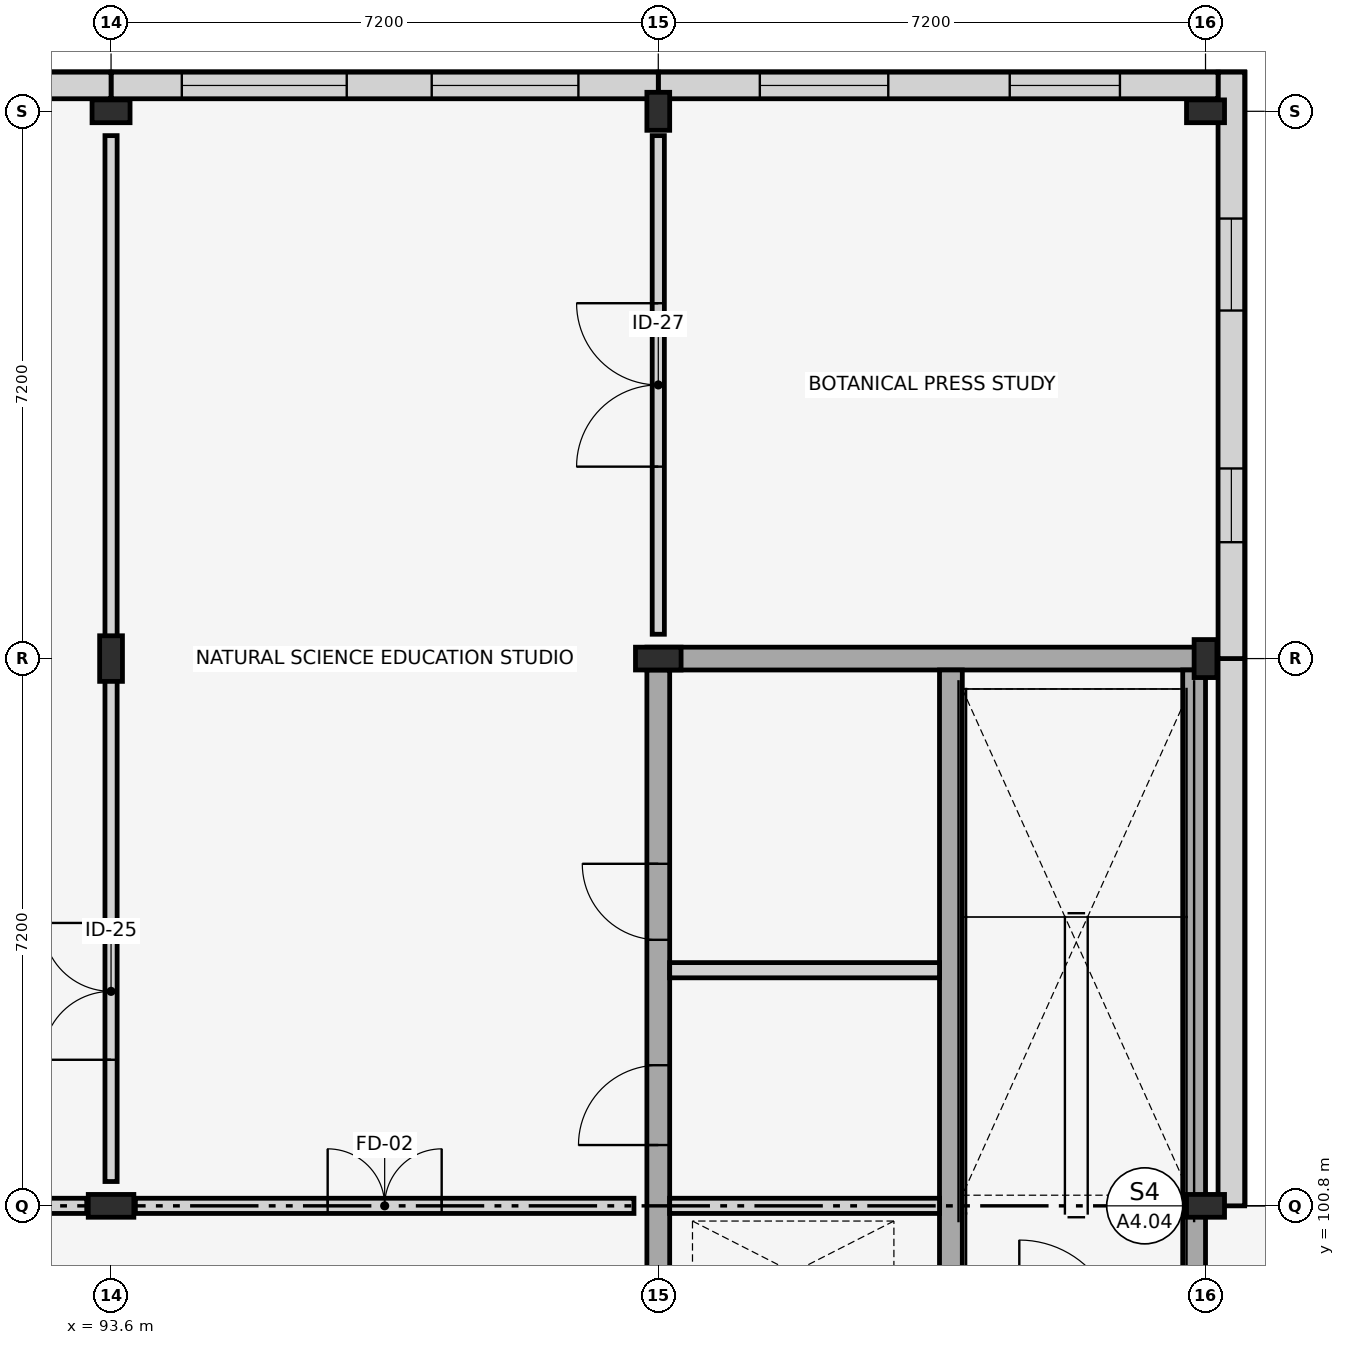
"""IFC4 building model, lengths in metres.
Left out: names, types, materials, properties, quantities, classifications, styles, units other than length and angle.
Written with IfcOpenShell. Run it as: python <this file> out.ifc"""

import sys

from ifc_helpers import new_model, si_unit, direction, frame, frame_2d, origin, origin_2d, place, context, subcontext, project, spatial, rectangle, i_section, extrude, element, fill, save


model = new_model("IFC4")
c1 = context("Model", 3, precision=1e-05, world=origin(), true_north=direction((0.0, 1.0)))
c2 = subcontext(c1, "Body", "Model", "MODEL_VIEW")
j1 = project(units=[si_unit("LENGTHUNIT", "METRE"), si_unit("PLANEANGLEUNIT", "RADIAN")], contexts=[c1])
p1 = place(None, origin())
s1 = spatial("IfcSite", under=j1, at=p1, CompositionType="ELEMENT")
p2 = place(p1, origin())
s2 = spatial("IfcBuilding", under=s1, at=p2, CompositionType="ELEMENT")
p3 = place(p2, origin())
s3 = spatial("IfcBuildingStorey", under=s2, at=p3, CompositionType="ELEMENT", Elevation=0.0)
for number, where, z_axis, x_axis in (
    (1, (93.6, 100.8, 0.0), (0.0, 0.0, 1.0), (0.0, 1.0, 0.0)),
    (2, (93.6, 108.0, 0.0), (0.0, 0.0, 1.0), (1.0, 0.0, 0.0)),
):
    element("IfcColumn", number, at=place(p3, frame(where, z_axis=z_axis, x_axis=x_axis)), inside=s3, PredefinedType="COLUMN", context=c2, shape_type="SweptSolid", body=[
        extrude(i_section(OverallWidth=0.3, OverallDepth=0.6, WebThickness=0.015, FlangeThickness=0.03, FilletRadius=0.027, at=origin_2d()), origin(), (0.0, 0.0, 1.0), 4.5),
    ])
p4 = place(p3, frame((93.6, 115.2, 0.0), z_axis=(0.0, 0.0, 1.0), x_axis=(0.0, 1.0, 0.0)))
e3 = element("IfcColumn", 3, at=p4, inside=s3, PredefinedType="COLUMN", context=c2, shape_type="SweptSolid", body=[
    extrude(i_section(OverallWidth=0.3, OverallDepth=0.5, WebThickness=0.014, FlangeThickness=0.028, FilletRadius=0.027, at=origin_2d()), origin(), (0.0, 0.0, 1.0), 4.5),
])
p5 = place(p3, frame((100.8, 108.0, 0.0), z_axis=(0.0, 0.0, 1.0), x_axis=(0.0, 1.0, 0.0)))
e4 = element("IfcColumn", 4, at=p5, inside=s3, PredefinedType="COLUMN", context=c2, shape_type="SweptSolid", body=[
    extrude(i_section(OverallWidth=0.3, OverallDepth=0.6, WebThickness=0.015, FlangeThickness=0.03, FilletRadius=0.027, at=origin_2d()), origin(), (0.0, 0.0, 1.0), 4.5),
])
for number, where, z_axis, x_axis in (
    (5, (100.8, 115.2, 0.0), (0.0, 0.0, 1.0), (1.0, 0.0, 0.0)),
    (6, (108.0, 100.8, 0.0), (0.0, 0.0, 1.0), (0.0, 1.0, 0.0)),
    (7, (108.0, 108.0, 0.0), (0.0, 0.0, 1.0), (1.0, 0.0, 0.0)),
    (8, (108.0, 115.2, 0.0), (0.0, 0.0, 1.0), (0.0, 1.0, 0.0)),
):
    element("IfcColumn", number, at=place(p3, frame(where, z_axis=z_axis, x_axis=x_axis)), inside=s3, PredefinedType="COLUMN", context=c2, shape_type="SweptSolid", body=[
        extrude(i_section(OverallWidth=0.3, OverallDepth=0.5, WebThickness=0.014, FlangeThickness=0.028, FilletRadius=0.027, at=origin_2d()), origin(), (0.0, 0.0, 1.0), 4.5),
    ])
p6 = place(p3, frame((108.34, 100.8, 0.0), z_axis=(0.0, 0.0, 1.0), x_axis=(0.0, 1.0, 0.0)))
e9 = element("IfcWall", 9, at=p6, inside=s3, PredefinedType="STANDARD", context=c2, shape_type="SweptSolid", body=[
    extrude(rectangle(XDim=7.2, YDim=0.35, at=frame_2d((3.6, 0.0))), origin(), (0.0, 0.0, 1.0), 4.5),
])
p7 = place(p3, frame((108.34, 108.0, 0.0), z_axis=(0.0, 0.0, 1.0), x_axis=(0.0, 1.0, 0.0)))
e10 = element("IfcWall", 10, at=p7, inside=s3, PredefinedType="STANDARD", context=c2, shape_type="SweptSolid", body=[
    extrude(rectangle(XDim=7.715, YDim=0.35, at=frame_2d((3.857, 0.0))), origin(), (0.0, 0.0, 1.0), 4.5),
])
p8 = place(p7, frame((1.531, 0.0, 0.9)))
e11 = element("IfcOpeningElement", 11, at=p8, cuts=e10, PredefinedType="OPENING", context=c2, shape_type="SweptSolid", body=[
    extrude(rectangle(XDim=0.97, YDim=1.96, at=frame_2d((0.485, 0.98))), frame((0.0, 0.185, 0.0), z_axis=(0.0, -1.0, 0.0), x_axis=(1.0, 0.0, 0.0)), (0.0, 0.0, 1.0), 0.37),
])
p9 = place(p7, frame((4.579, 0.0, 0.9)))
e12 = element("IfcOpeningElement", 12, at=p9, cuts=e10, PredefinedType="OPENING", context=c2, shape_type="SweptSolid", body=[
    extrude(rectangle(XDim=1.21, YDim=1.96, at=frame_2d((0.605, 0.98))), frame((0.0, 0.185, 0.0), z_axis=(0.0, -1.0, 0.0), x_axis=(1.0, 0.0, 0.0)), (0.0, 0.0, 1.0), 0.37),
])
p10 = place(p3, frame((108.165, 115.54, 0.0), z_axis=(0.0, 0.0, 1.0), x_axis=(-1.0, 0.0, 0.0)))
e13 = element("IfcWall", 13, at=p10, inside=s3, PredefinedType="STANDARD", context=c2, shape_type="SweptSolid", body=[
    extrude(rectangle(XDim=7.365, YDim=0.35, at=frame_2d((3.683, 0.0))), origin(), (0.0, 0.0, 1.0), 4.5),
])
p11 = place(p10, frame((1.291, 0.0, 0.9)))
e14 = element("IfcOpeningElement", 14, at=p11, cuts=e13, PredefinedType="OPENING", context=c2, shape_type="SweptSolid", body=[
    extrude(rectangle(XDim=1.45, YDim=1.96, at=frame_2d((0.725, 0.98))), frame((0.0, 0.185, 0.0), z_axis=(0.0, -1.0, 0.0), x_axis=(1.0, 0.0, 0.0)), (0.0, 0.0, 1.0), 0.37),
])
p12 = place(p10, frame((4.339, 0.0, 0.9)))
e15 = element("IfcOpeningElement", 15, at=p12, cuts=e13, PredefinedType="OPENING", context=c2, shape_type="SweptSolid", body=[
    extrude(rectangle(XDim=1.69, YDim=1.96, at=frame_2d((0.845, 0.98))), frame((0.0, 0.185, 0.0), z_axis=(0.0, -1.0, 0.0), x_axis=(1.0, 0.0, 0.0)), (0.0, 0.0, 1.0), 0.37),
])
p13 = place(p3, frame((100.8, 115.54, 0.0), z_axis=(0.0, 0.0, 1.0), x_axis=(-1.0, 0.0, 0.0)))
e16 = element("IfcWall", 16, at=p13, inside=s3, PredefinedType="STANDARD", context=c2, shape_type="SweptSolid", body=[
    extrude(rectangle(XDim=7.2, YDim=0.35, at=frame_2d((3.6, 0.0))), origin(), (0.0, 0.0, 1.0), 4.5),
])
p14 = place(p13, frame((1.051, 0.0, 0.9)))
e17 = element("IfcOpeningElement", 17, at=p14, cuts=e16, PredefinedType="OPENING", context=c2, shape_type="SweptSolid", body=[
    extrude(rectangle(XDim=1.93, YDim=1.96, at=frame_2d((0.965, 0.98))), frame((0.0, 0.185, 0.0), z_axis=(0.0, -1.0, 0.0), x_axis=(1.0, 0.0, 0.0)), (0.0, 0.0, 1.0), 0.37),
])
p15 = place(p13, frame((4.099, 0.0, 0.9)))
e18 = element("IfcOpeningElement", 18, at=p15, cuts=e16, PredefinedType="OPENING", context=c2, shape_type="SweptSolid", body=[
    extrude(rectangle(XDim=2.17, YDim=1.96, at=frame_2d((1.085, 0.98))), frame((0.0, 0.185, 0.0), z_axis=(0.0, -1.0, 0.0), x_axis=(1.0, 0.0, 0.0)), (0.0, 0.0, 1.0), 0.37),
])
p16 = place(p3, frame((93.6, 115.54, 0.0), z_axis=(0.0, 0.0, 1.0), x_axis=(-1.0, 0.0, 0.0)))
e19 = element("IfcWall", 19, at=p16, inside=s3, PredefinedType="STANDARD", context=c2, shape_type="SweptSolid", body=[
    extrude(rectangle(XDim=7.2, YDim=0.35, at=frame_2d((3.6, 0.0))), origin(), (0.0, 0.0, 1.0), 4.5),
])
p17 = place(p16, frame((1.516, 0.0, 0.9)))
e20 = element("IfcOpeningElement", 20, at=p17, cuts=e19, PredefinedType="OPENING", context=c2, shape_type="SweptSolid", body=[
    extrude(rectangle(XDim=1.0, YDim=2.1, at=frame_2d((0.5, 1.05))), frame((0.0, 0.185, 0.0), z_axis=(0.0, -1.0, 0.0), x_axis=(1.0, 0.0, 0.0)), (0.0, 0.0, 1.0), 0.37),
])
p18 = place(p16, frame((4.564, 0.0, 0.9)))
e21 = element("IfcOpeningElement", 21, at=p18, cuts=e19, PredefinedType="OPENING", context=c2, shape_type="SweptSolid", body=[
    extrude(rectangle(XDim=1.24, YDim=2.1, at=frame_2d((0.62, 1.05))), frame((0.0, 0.185, 0.0), z_axis=(0.0, -1.0, 0.0), x_axis=(1.0, 0.0, 0.0)), (0.0, 0.0, 1.0), 0.37),
])
p19 = place(p3, frame((100.65, 108.0, 0.0), z_axis=(0.0, 0.0, 1.0), x_axis=(1.0, 0.0, 0.0)))
e22 = element("IfcWall", 22, at=p19, inside=s3, PredefinedType="SHEAR", context=c2, shape_type="SweptSolid", body=[
    extrude(rectangle(XDim=7.35, YDim=0.3, at=frame_2d((3.675, 0.0))), origin(), (0.0, 0.0, 1.0), 4.28),
])
p20 = place(p3, frame((107.85, 93.75, 0.0), z_axis=(0.0, 0.0, 1.0), x_axis=(0.0, 1.0, 0.0)))
e23 = element("IfcWall", 23, at=p20, inside=s3, PredefinedType="SHEAR", context=c2, shape_type="SweptSolid", body=[
    extrude(rectangle(XDim=7.05, YDim=0.3, at=frame_2d((3.525, 0.0))), origin(), (0.0, 0.0, 1.0), 4.28),
])
p21 = place(p20, frame((3.65, 0.0, 0.0)))
e24 = element("IfcOpeningElement", 24, at=p21, cuts=e23, PredefinedType="OPENING", context=c2, shape_type="SweptSolid", body=[
    extrude(rectangle(XDim=1.1, YDim=2.2, at=frame_2d((0.55, 1.1))), frame((0.0, 0.16, 0.0), z_axis=(0.0, -1.0, 0.0), x_axis=(1.0, 0.0, 0.0)), (0.0, 0.0, 1.0), 0.32),
])
p22 = place(p3, frame((107.85, 100.8, 0.0), z_axis=(0.0, 0.0, 1.0), x_axis=(0.0, 1.0, 0.0)))
e25 = element("IfcWall", 25, at=p22, inside=s3, PredefinedType="SHEAR", context=c2, shape_type="SweptSolid", body=[
    extrude(rectangle(XDim=7.05, YDim=0.3, at=frame_2d((3.525, 0.0))), origin(), (0.0, 0.0, 1.0), 4.28),
])
p23 = place(p3, frame((100.8, 93.75, 0.0), z_axis=(0.0, 0.0, 1.0), x_axis=(0.0, 1.0, 0.0)))
e26 = element("IfcWall", 26, at=p23, inside=s3, PredefinedType="SHEAR", context=c2, shape_type="SweptSolid", body=[
    extrude(rectangle(XDim=14.1, YDim=0.3, at=frame_2d((7.05, 0.0))), origin(), (0.0, 0.0, 1.0), 4.28),
])
p24 = place(p23, frame((3.55, 0.0, 0.0)))
e27 = element("IfcOpeningElement", 27, at=p24, cuts=e26, PredefinedType="OPENING", context=c2, shape_type="SweptSolid", body=[
    extrude(rectangle(XDim=1.3, YDim=2.2, at=frame_2d((0.65, 1.1))), frame((0.0, 0.16, 0.0), z_axis=(0.0, -1.0, 0.0), x_axis=(1.0, 0.0, 0.0)), (0.0, 0.0, 1.0), 0.32),
])
p25 = place(p23, frame((7.85, 0.0, 0.0)))
e28 = element("IfcOpeningElement", 28, at=p25, cuts=e26, PredefinedType="OPENING", context=c2, shape_type="SweptSolid", body=[
    extrude(rectangle(XDim=1.05, YDim=2.15, at=frame_2d((0.525, 1.075))), frame((0.0, 0.16, 0.0), z_axis=(0.0, -1.0, 0.0), x_axis=(1.0, 0.0, 0.0)), (0.0, 0.0, 1.0), 0.32),
])
p26 = place(p23, frame((10.55, 0.0, 0.0)))
e29 = element("IfcOpeningElement", 29, at=p26, cuts=e26, PredefinedType="OPENING", context=c2, shape_type="SweptSolid", body=[
    extrude(rectangle(XDim=1.0, YDim=2.15, at=frame_2d((0.5, 1.075))), frame((0.0, 0.16, 0.0), z_axis=(0.0, -1.0, 0.0), x_axis=(1.0, 0.0, 0.0)), (0.0, 0.0, 1.0), 0.32),
])
p27 = place(p3, frame((104.65, 98.94, 0.0), z_axis=(0.0, 0.0, 1.0), x_axis=(0.0, 1.0, 0.0)))
e30 = element("IfcWall", 30, at=p27, inside=s3, PredefinedType="SHEAR", context=c2, shape_type="SweptSolid", body=[
    extrude(rectangle(XDim=8.91, YDim=0.3, at=frame_2d((4.455, 0.0))), origin(), (0.0, 0.0, 1.0), 4.28),
])
for number, where, z_axis, x_axis in (
    (31, (100.95, 100.8, 0.0), (0.0, 0.0, 1.0), (1.0, 0.0, 0.0)),
    (32, (100.95, 103.9, 0.0), (0.0, 0.0, 1.0), (1.0, 0.0, 0.0)),
):
    element("IfcWall", number, at=place(p3, frame(where, z_axis=z_axis, x_axis=x_axis)), inside=s3, PredefinedType="PLUMBINGWALL", context=c2, shape_type="SweptSolid", body=[
        extrude(rectangle(XDim=3.55, YDim=0.2, at=frame_2d((1.775, 0.0))), origin(), (0.0, 0.0, 1.0), 3.7),
    ])
p28 = place(p3, frame((65.12, 100.8, 0.0), z_axis=(0.0, 0.0, 1.0), x_axis=(1.0, 0.0, 0.0)))
e33 = element("IfcWall", 33, at=p28, inside=s3, PredefinedType="PARTITIONING", context=c2, shape_type="SweptSolid", body=[
    extrude(rectangle(XDim=28.16, YDim=0.2, at=frame_2d((14.08, 0.0))), origin(), (0.0, 0.0, 1.0), 3.45),
])
p29 = place(p28, frame((1.649, 0.0, 0.0)))
e34 = element("IfcOpeningElement", 34, at=p29, cuts=e33, PredefinedType="OPENING", context=c2, shape_type="SweptSolid", body=[
    extrude(rectangle(XDim=1.6, YDim=2.35, at=frame_2d((0.8, 1.175))), frame((0.0, 0.11, 0.0), z_axis=(0.0, -1.0, 0.0), x_axis=(1.0, 0.0, 0.0)), (0.0, 0.0, 1.0), 0.22),
])
p30 = place(p3, frame((93.92, 100.8, 0.0), z_axis=(0.0, 0.0, 1.0), x_axis=(1.0, 0.0, 0.0)))
e35 = element("IfcWall", 35, at=p30, inside=s3, PredefinedType="PARTITIONING", context=c2, shape_type="SweptSolid", body=[
    extrude(rectangle(XDim=6.56, YDim=0.2, at=frame_2d((3.28, 0.0))), origin(), (0.0, 0.0, 1.0), 3.45),
])
p31 = place(p30, frame((2.53, 0.0, 0.0)))
e36 = element("IfcOpeningElement", 36, at=p31, cuts=e35, PredefinedType="OPENING", context=c2, shape_type="SweptSolid", body=[
    extrude(rectangle(XDim=1.5, YDim=2.25, at=frame_2d((0.75, 1.125))), frame((0.0, 0.11, 0.0), z_axis=(0.0, -1.0, 0.0), x_axis=(1.0, 0.0, 0.0)), (0.0, 0.0, 1.0), 0.22),
])
p32 = place(p3, frame((93.6, 101.12, 0.0), z_axis=(0.0, 0.0, 1.0), x_axis=(0.0, 1.0, 0.0)))
e37 = element("IfcWall", 37, at=p32, inside=s3, PredefinedType="PARTITIONING", context=c2, shape_type="SweptSolid", body=[
    extrude(rectangle(XDim=13.76, YDim=0.16, at=frame_2d((6.88, 0.0))), origin(), (0.0, 0.0, 1.0), 3.45),
])
p33 = place(p32, frame((1.602, 0.0, 0.0)))
e38 = element("IfcOpeningElement", 38, at=p33, cuts=e37, PredefinedType="OPENING", context=c2, shape_type="SweptSolid", body=[
    extrude(rectangle(XDim=1.8, YDim=2.55, at=frame_2d((0.9, 1.275))), frame((0.0, 0.09, 0.0), z_axis=(0.0, -1.0, 0.0), x_axis=(1.0, 0.0, 0.0)), (0.0, 0.0, 1.0), 0.18),
])
p34 = place(p3, frame((100.8, 108.32, 0.0), z_axis=(0.0, 0.0, 1.0), x_axis=(0.0, 1.0, 0.0)))
e39 = element("IfcWall", 39, at=p34, inside=s3, PredefinedType="PARTITIONING", context=c2, shape_type="SweptSolid", body=[
    extrude(rectangle(XDim=6.56, YDim=0.16, at=frame_2d((3.28, 0.0))), origin(), (0.0, 0.0, 1.0), 3.45),
])
p35 = place(p34, frame((2.205, 0.0, 0.0)))
e40 = element("IfcOpeningElement", 40, at=p35, cuts=e39, PredefinedType="OPENING", context=c2, shape_type="SweptSolid", body=[
    extrude(rectangle(XDim=2.15, YDim=2.65, at=frame_2d((1.075, 1.325))), frame((0.0, 0.09, 0.0), z_axis=(0.0, -1.0, 0.0), x_axis=(1.0, 0.0, 0.0)), (0.0, 0.0, 1.0), 0.18),
])
p36 = place(p8, origin())
e41 = element("IfcWindow", 41, at=p36, inside=s3, PartitioningType="SINGLE_PANEL", PredefinedType="WINDOW", context=c2, shape_type="SweptSolid", body=[
    extrude(rectangle(XDim=0.97, YDim=1.96, at=frame_2d((0.485, 0.98))), frame((0.0, 0.03, 0.0), z_axis=(0.0, -1.0, 0.0), x_axis=(1.0, 0.0, 0.0)), (0.0, 0.0, 1.0), 0.06),
])
fill(e11, e41)
p37 = place(p9, origin())
e42 = element("IfcWindow", 42, at=p37, inside=s3, PartitioningType="SINGLE_PANEL", PredefinedType="WINDOW", context=c2, shape_type="SweptSolid", body=[
    extrude(rectangle(XDim=1.21, YDim=1.96, at=frame_2d((0.605, 0.98))), frame((0.0, 0.03, 0.0), z_axis=(0.0, -1.0, 0.0), x_axis=(1.0, 0.0, 0.0)), (0.0, 0.0, 1.0), 0.06),
])
fill(e12, e42)
p38 = place(p11, origin())
e43 = element("IfcWindow", 43, at=p38, inside=s3, PartitioningType="SINGLE_PANEL", PredefinedType="WINDOW", context=c2, shape_type="SweptSolid", body=[
    extrude(rectangle(XDim=1.45, YDim=1.96, at=frame_2d((0.725, 0.98))), frame((0.0, 0.03, 0.0), z_axis=(0.0, -1.0, 0.0), x_axis=(1.0, 0.0, 0.0)), (0.0, 0.0, 1.0), 0.06),
])
fill(e14, e43)
p39 = place(p12, origin())
e44 = element("IfcWindow", 44, at=p39, inside=s3, PartitioningType="SINGLE_PANEL", PredefinedType="WINDOW", context=c2, shape_type="SweptSolid", body=[
    extrude(rectangle(XDim=1.69, YDim=1.96, at=frame_2d((0.845, 0.98))), frame((0.0, 0.03, 0.0), z_axis=(0.0, -1.0, 0.0), x_axis=(1.0, 0.0, 0.0)), (0.0, 0.0, 1.0), 0.06),
])
fill(e15, e44)
p40 = place(p14, origin())
e45 = element("IfcWindow", 45, at=p40, inside=s3, PartitioningType="SINGLE_PANEL", PredefinedType="WINDOW", context=c2, shape_type="SweptSolid", body=[
    extrude(rectangle(XDim=1.93, YDim=1.96, at=frame_2d((0.965, 0.98))), frame((0.0, 0.03, 0.0), z_axis=(0.0, -1.0, 0.0), x_axis=(1.0, 0.0, 0.0)), (0.0, 0.0, 1.0), 0.06),
])
fill(e17, e45)
p41 = place(p15, origin())
e46 = element("IfcWindow", 46, at=p41, inside=s3, PartitioningType="SINGLE_PANEL", PredefinedType="WINDOW", context=c2, shape_type="SweptSolid", body=[
    extrude(rectangle(XDim=2.17, YDim=1.96, at=frame_2d((1.085, 0.98))), frame((0.0, 0.03, 0.0), z_axis=(0.0, -1.0, 0.0), x_axis=(1.0, 0.0, 0.0)), (0.0, 0.0, 1.0), 0.06),
])
fill(e18, e46)
p42 = place(p25, origin())
e47 = element("IfcDoor", 47, at=p42, inside=s3, OperationType="SINGLE_SWING_LEFT", PredefinedType="DOOR", context=c2, shape_type="SweptSolid", body=[
    extrude(rectangle(XDim=1.05, YDim=2.15, at=frame_2d((0.525, 1.075))), frame((0.0, 0.025, 0.0), z_axis=(0.0, -1.0, 0.0), x_axis=(1.0, 0.0, 0.0)), (0.0, 0.0, 1.0), 0.05),
])
fill(e28, e47)
p43 = place(p26, origin())
e48 = element("IfcDoor", 48, at=p43, inside=s3, OperationType="SINGLE_SWING_RIGHT", PredefinedType="DOOR", context=c2, shape_type="SweptSolid", body=[
    extrude(rectangle(XDim=1.0, YDim=2.15, at=frame_2d((0.5, 1.075))), frame((0.0, 0.025, 0.0), z_axis=(0.0, -1.0, 0.0), x_axis=(1.0, 0.0, 0.0)), (0.0, 0.0, 1.0), 0.05),
])
fill(e29, e48)
p44 = place(p31, origin())
e49 = element("IfcDoor", 49, at=p44, inside=s3, OperationType="DOUBLE_DOOR_SINGLE_SWING", PredefinedType="DOOR", context=c2, shape_type="SweptSolid", body=[
    extrude(rectangle(XDim=1.5, YDim=2.25, at=frame_2d((0.75, 1.125))), frame((0.0, 0.025, 0.0), z_axis=(0.0, -1.0, 0.0), x_axis=(1.0, 0.0, 0.0)), (0.0, 0.0, 1.0), 0.05),
])
fill(e36, e49)
p45 = place(p33, origin())
e50 = element("IfcDoor", 50, at=p45, inside=s3, OperationType="DOUBLE_DOOR_SINGLE_SWING", PredefinedType="DOOR", context=c2, shape_type="SweptSolid", body=[
    extrude(rectangle(XDim=1.8, YDim=2.55, at=frame_2d((0.9, 1.275))), frame((0.0, 0.025, 0.0), z_axis=(0.0, -1.0, 0.0), x_axis=(1.0, 0.0, 0.0)), (0.0, 0.0, 1.0), 0.05),
])
fill(e38, e50)
p46 = place(p35, origin())
e51 = element("IfcDoor", 51, at=p46, inside=s3, OperationType="DOUBLE_DOOR_SINGLE_SWING", PredefinedType="DOOR", context=c2, shape_type="SweptSolid", body=[
    extrude(rectangle(XDim=2.15, YDim=2.65, at=frame_2d((1.075, 1.325))), frame((0.0, 0.025, 0.0), z_axis=(0.0, -1.0, 0.0), x_axis=(1.0, 0.0, 0.0)), (0.0, 0.0, 1.0), 0.05),
])
fill(e40, e51)
save(model, sys.argv[1])
